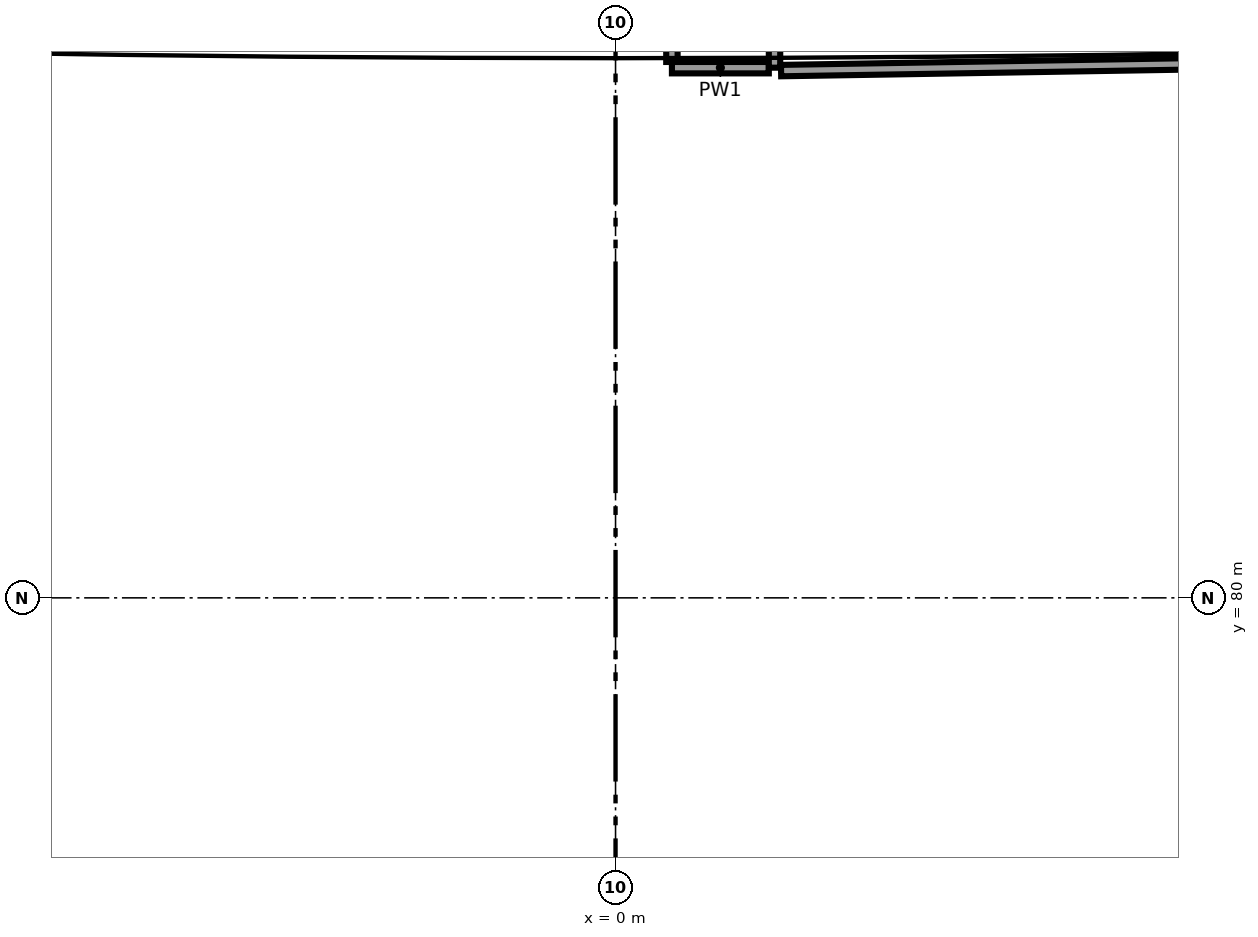
"""IFC4 building model, lengths in metres.
Left out: names, types, materials, properties, quantities, classifications, styles, units other than length and angle.
Written with IfcOpenShell. Run it as: python <this file> out.ifc"""

import sys

from ifc_helpers import new_model, si_unit, direction, frame, frame_2d, origin, place, context, subcontext, project, spatial, rectangle, extrude, element, save


model = new_model("IFC4")
c1 = context("Model", 3, precision=1e-05, world=origin(), true_north=direction((0.0, 1.0)))
c2 = subcontext(c1, "Body", "Model", "MODEL_VIEW")
j1 = project(units=[si_unit("LENGTHUNIT", "METRE"), si_unit("PLANEANGLEUNIT", "RADIAN")], contexts=[c1])
p1 = place(None, origin())
s1 = spatial("IfcSite", under=j1, at=p1, CompositionType="ELEMENT")
p2 = place(p1, origin())
s2 = spatial("IfcBuilding", under=s1, at=p2, CompositionType="ELEMENT")
p3 = place(p2, frame((0.0, 0.0, 24.0)))
s3 = spatial("IfcBuildingStorey", under=s2, at=p3, CompositionType="ELEMENT", Elevation=24.0)
for number, where, z_axis, x_axis in (
    (1, (0.742, 88.325, 0.0), (0.0, 0.0, 1.0), (0.0, -1.0, 0.0)),
    (2, (0.742, 86.975, 0.0), (0.0, 0.0, 1.0), (1.0, 0.0, 0.0)),
    (3, (2.092, 86.975, 0.0), (0.0, 0.0, 1.0), (0.0, 1.0, 0.0)),
):
    element("IfcWall", number, at=place(p3, frame(where, z_axis=z_axis, x_axis=x_axis)), inside=s3, PredefinedType="PARTITIONING", context=c2, shape_type="SweptSolid", body=[
        extrude(rectangle(XDim=1.275, YDim=0.15, at=frame_2d((0.637, 0.0))), origin(), (0.0, 0.0, 1.0), 5.4),
    ])
p4 = place(p3, frame((2.178, 86.937, 0.0), z_axis=(0.0, 0.0, 1.0), x_axis=(0.999864668818, 0.016451262841, 0.0)))
e4 = element("IfcWall", 4, at=p4, inside=s3, PredefinedType="PARTITIONING", context=c2, shape_type="SweptSolid", body=[
    extrude(rectangle(XDim=12.466, YDim=0.15, at=frame_2d((6.233, 0.0))), origin(), (0.0, 0.0, 1.0), 5.4),
])
save(model, sys.argv[1])
